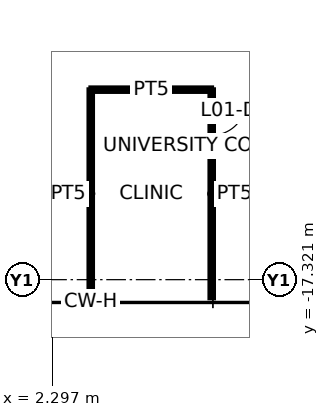
"""IFC4 building model, lengths in metres.
Left out: names, types, materials, properties, quantities, classifications, styles, units other than length and angle.
Written with IfcOpenShell. Run it as: python <this file> out.ifc"""

import sys

from ifc_helpers import new_model, si_unit, direction, frame, frame_2d, origin, place, context, subcontext, project, spatial, rectangle, extrude, element, fill, save


model = new_model("IFC4")
c1 = context("Model", 3, precision=1e-05, world=origin(), true_north=direction((0.0, 1.0)))
c2 = subcontext(c1, "Body", "Model", "MODEL_VIEW")
j1 = project(units=[si_unit("LENGTHUNIT", "METRE"), si_unit("PLANEANGLEUNIT", "RADIAN")], contexts=[c1])
p1 = place(None, origin())
s1 = spatial("IfcSite", under=j1, at=p1, CompositionType="ELEMENT")
p2 = place(p1, origin())
s2 = spatial("IfcBuilding", under=s1, at=p2, CompositionType="ELEMENT")
p3 = place(p2, origin())
s3 = spatial("IfcBuildingStorey", under=s2, at=p3, CompositionType="ELEMENT", Elevation=0.0)
p4 = place(p3, frame((3.31, -17.794, 0.0), z_axis=(0.0, 0.0, 1.0), x_axis=(0.0, 1.0, 0.0)))
e1 = element("IfcWall", 1, at=p4, inside=s3, PredefinedType="PARTITIONING", context=c2, shape_type="SweptSolid", body=[
    extrude(rectangle(XDim=5.474, YDim=0.1, at=frame_2d((2.737, 0.0))), origin(), (0.0, 0.0, 1.0), 4.5),
])
p5 = place(p3, frame((3.31, -12.321, 0.0), z_axis=(0.0, 0.0, 1.0), x_axis=(1.0, 0.0, 0.0)))
e2 = element("IfcWall", 2, at=p5, inside=s3, PredefinedType="PARTITIONING", context=c2, shape_type="SweptSolid", body=[
    extrude(rectangle(XDim=3.183, YDim=0.1, at=frame_2d((1.592, 0.0))), origin(), (0.0, 0.0, 1.0), 4.5),
])
p6 = place(p3, frame((6.493, -12.321, 0.0), z_axis=(0.0, 0.0, 1.0), x_axis=(0.0, -1.0, 0.0)))
e3 = element("IfcWall", 3, at=p6, inside=s3, PredefinedType="PARTITIONING", context=c2, shape_type="SweptSolid", body=[
    extrude(rectangle(XDim=5.48, YDim=0.1, at=frame_2d((2.74, 0.0))), origin(), (0.0, 0.0, 1.0), 4.5),
])
p7 = place(p6, frame((0.3, 0.0, 0.0)))
e4 = element("IfcOpeningElement", 4, at=p7, cuts=e3, PredefinedType="OPENING", context=c2, shape_type="SweptSolid", body=[
    extrude(rectangle(XDim=0.9, YDim=2.1, at=frame_2d((0.45, 1.05))), frame((0.0, 0.06, 0.0), z_axis=(0.0, -1.0, 0.0), x_axis=(1.0, 0.0, 0.0)), (0.0, 0.0, 1.0), 0.12),
])
p8 = place(p7, origin())
e5 = element("IfcDoor", 5, at=p8, inside=s3, OperationType="SINGLE_SWING_LEFT", PredefinedType="DOOR", context=c2, shape_type="SweptSolid", body=[
    extrude(rectangle(XDim=0.9, YDim=2.1, at=frame_2d((0.45, 1.05))), frame((0.0, 0.025, 0.0), z_axis=(0.0, -1.0, 0.0), x_axis=(1.0, 0.0, 0.0)), (0.0, 0.0, 1.0), 0.05),
])
fill(e4, e5)
save(model, sys.argv[1])
